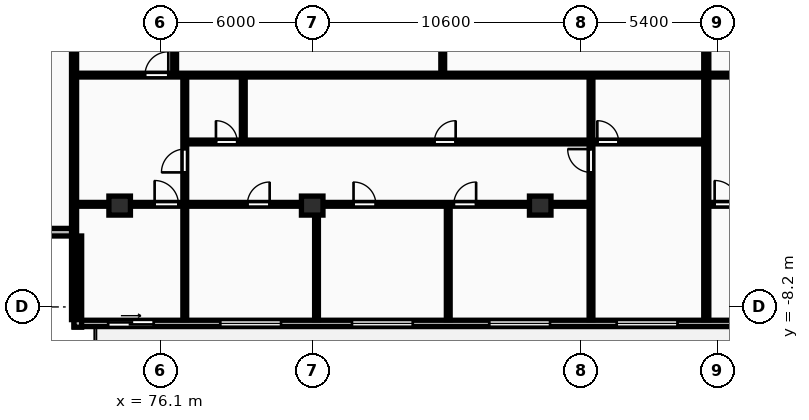
"""IFC4 building model, lengths in metres.
Left out: names, types, materials, properties, quantities, classifications, styles, units other than length and angle.
Written with IfcOpenShell. Run it as: python <this file> out.ifc"""

import sys

from ifc_helpers import new_model, si_unit, direction, frame, frame_2d, origin, origin_2d, place, context, subcontext, project, spatial, rectangle, extrude, element, fill, save


model = new_model("IFC4")
c1 = context("Model", 3, precision=1e-05, world=origin(), true_north=direction((0.0, 1.0)))
c2 = subcontext(c1, "Body", "Model", "MODEL_VIEW")
j1 = project(units=[si_unit("LENGTHUNIT", "METRE"), si_unit("PLANEANGLEUNIT", "RADIAN")], contexts=[c1])
p1 = place(None, origin())
s1 = spatial("IfcSite", under=j1, at=p1, CompositionType="ELEMENT")
p2 = place(p1, origin())
s2 = spatial("IfcBuilding", under=s1, at=p2, CompositionType="ELEMENT")
p3 = place(p2, frame((0.0, 0.0, 126.3)))
s3 = spatial("IfcBuildingStorey", under=s2, at=p3, CompositionType="ELEMENT", Elevation=126.3)
for number, where, z_axis, x_axis in (
    (1, (74.5, -4.2, 0.0), (0.0, 0.0, 1.0), (1.0, 0.0, 0.0)),
    (2, (82.1, -4.2, 0.0), (0.0, 0.0, 1.0), (1.0, 0.0, 0.0)),
    (3, (91.1, -4.2, 0.0), (0.0, 0.0, 1.0), (1.0, 0.0, 0.0)),
):
    element("IfcColumn", number, at=place(p3, frame(where, z_axis=z_axis, x_axis=x_axis)), inside=s3, PredefinedType="COLUMN", context=c2, shape_type="SweptSolid", body=[
        extrude(rectangle(XDim=0.85, YDim=0.75, at=origin_2d()), origin(), (0.0, 0.0, 1.0), 3.25),
    ])
p4 = place(p3, frame((72.7, -8.85, 0.0), z_axis=(0.0, 0.0, 1.0), x_axis=(1.0, 0.0, 0.0)))
e4 = element("IfcWall", 4, at=p4, inside=s3, PredefinedType="STANDARD", context=c2, shape_type="SweptSolid", body=[
    extrude(rectangle(XDim=58.0, YDim=0.25, at=frame_2d((29.0, 0.0))), origin(), (0.0, 0.0, 1.0), 2.97),
])
p5 = place(p4, frame((5.77, 0.0, 0.85)))
e5 = element("IfcOpeningElement", 5, at=p5, cuts=e4, PredefinedType="OPENING", context=c2, shape_type="SweptSolid", body=[
    extrude(rectangle(XDim=2.4, YDim=1.9, at=frame_2d((1.2, 0.95))), frame((0.0, 0.135, 0.0), z_axis=(0.0, -1.0, 0.0), x_axis=(1.0, 0.0, 0.0)), (0.0, 0.0, 1.0), 0.27),
])
p6 = place(p4, frame((10.97, 0.0, 0.85)))
e6 = element("IfcOpeningElement", 6, at=p6, cuts=e4, PredefinedType="OPENING", context=c2, shape_type="SweptSolid", body=[
    extrude(rectangle(XDim=2.4, YDim=1.9, at=frame_2d((1.2, 0.95))), frame((0.0, 0.135, 0.0), z_axis=(0.0, -1.0, 0.0), x_axis=(1.0, 0.0, 0.0)), (0.0, 0.0, 1.0), 0.27),
])
p7 = place(p4, frame((16.387, 0.0, 0.85)))
e7 = element("IfcOpeningElement", 7, at=p7, cuts=e4, PredefinedType="OPENING", context=c2, shape_type="SweptSolid", body=[
    extrude(rectangle(XDim=2.4, YDim=1.9, at=frame_2d((1.2, 0.95))), frame((0.0, 0.135, 0.0), z_axis=(0.0, -1.0, 0.0), x_axis=(1.0, 0.0, 0.0)), (0.0, 0.0, 1.0), 0.27),
])
p8 = place(p4, frame((1.345, 0.0, 0.0)))
e8 = element("IfcOpeningElement", 8, at=p8, cuts=e4, PredefinedType="OPENING", context=c2, shape_type="SweptSolid", body=[
    extrude(rectangle(XDim=1.8, YDim=2.2, at=frame_2d((0.9, 1.1))), frame((0.0, 0.135, 0.0), z_axis=(0.0, -1.0, 0.0), x_axis=(1.0, 0.0, 0.0)), (0.0, 0.0, 1.0), 0.27),
])
p9 = place(p4, frame((21.419, 0.0, 0.85)))
e9 = element("IfcOpeningElement", 9, at=p9, cuts=e4, PredefinedType="OPENING", context=c2, shape_type="SweptSolid", body=[
    extrude(rectangle(XDim=2.4, YDim=1.9, at=frame_2d((1.2, 0.95))), frame((0.0, 0.135, 0.0), z_axis=(0.0, -1.0, 0.0), x_axis=(1.0, 0.0, 0.0)), (0.0, 0.0, 1.0), 0.27),
])
p10 = place(p4, frame((30.827, 0.0, 0.85)))
e10 = element("IfcOpeningElement", 10, at=p10, cuts=e4, PredefinedType="OPENING", context=c2, shape_type="SweptSolid", body=[
    extrude(rectangle(XDim=2.4, YDim=1.9, at=frame_2d((1.2, 0.95))), frame((0.0, 0.135, 0.0), z_axis=(0.0, -1.0, 0.0), x_axis=(1.0, 0.0, 0.0)), (0.0, 0.0, 1.0), 0.27),
])
p11 = place(p4, frame((35.688, 0.0, 0.85)))
e11 = element("IfcOpeningElement", 11, at=p11, cuts=e4, PredefinedType="OPENING", context=c2, shape_type="SweptSolid", body=[
    extrude(rectangle(XDim=2.4, YDim=1.9, at=frame_2d((1.2, 0.95))), frame((0.0, 0.135, 0.0), z_axis=(0.0, -1.0, 0.0), x_axis=(1.0, 0.0, 0.0)), (0.0, 0.0, 1.0), 0.27),
])
p12 = place(p4, frame((26.405, 0.0, 0.0)))
e12 = element("IfcOpeningElement", 12, at=p12, cuts=e4, PredefinedType="OPENING", context=c2, shape_type="SweptSolid", body=[
    extrude(rectangle(XDim=1.8, YDim=2.2, at=frame_2d((0.9, 1.1))), frame((0.0, 0.135, 0.0), z_axis=(0.0, -1.0, 0.0), x_axis=(1.0, 0.0, 0.0)), (0.0, 0.0, 1.0), 0.27),
])
p13 = place(p4, frame((40.161, 0.0, 0.85)))
e13 = element("IfcOpeningElement", 13, at=p13, cuts=e4, PredefinedType="OPENING", context=c2, shape_type="SweptSolid", body=[
    extrude(rectangle(XDim=2.4, YDim=1.9, at=frame_2d((1.2, 0.95))), frame((0.0, 0.135, 0.0), z_axis=(0.0, -1.0, 0.0), x_axis=(1.0, 0.0, 0.0)), (0.0, 0.0, 1.0), 0.27),
])
p14 = place(p4, frame((48.113, 0.0, 0.0)))
e14 = element("IfcOpeningElement", 14, at=p14, cuts=e4, PredefinedType="OPENING", context=c2, shape_type="SweptSolid", body=[
    extrude(rectangle(XDim=1.8, YDim=2.2, at=frame_2d((0.9, 1.1))), frame((0.0, 0.135, 0.0), z_axis=(0.0, -1.0, 0.0), x_axis=(1.0, 0.0, 0.0)), (0.0, 0.0, 1.0), 0.27),
])
p15 = place(p4, frame((54.9, 0.0, 0.85)))
e15 = element("IfcOpeningElement", 15, at=p15, cuts=e4, PredefinedType="OPENING", context=c2, shape_type="SweptSolid", body=[
    extrude(rectangle(XDim=2.4, YDim=1.9, at=frame_2d((1.2, 0.95))), frame((0.0, 0.135, 0.0), z_axis=(0.0, -1.0, 0.0), x_axis=(1.0, 0.0, 0.0)), (0.0, 0.0, 1.0), 0.27),
])
p16 = place(p3, frame((69.1, -5.25, 0.0), z_axis=(0.0, 0.0, 1.0), x_axis=(1.0, 0.0, 0.0)))
e16 = element("IfcWall", 16, at=p16, inside=s3, PredefinedType="STANDARD", context=c2, shape_type="SweptSolid", body=[
    extrude(rectangle(XDim=3.6, YDim=0.3, at=frame_2d((1.8, 0.0))), origin(), (0.0, 0.0, 1.0), 2.97),
])
p17 = place(p3, frame((72.85, -5.4, 0.0), z_axis=(0.0, 0.0, 1.0), x_axis=(0.0, -1.0, 0.0)))
e17 = element("IfcWall", 17, at=p17, inside=s3, PredefinedType="STANDARD", context=c2, shape_type="SweptSolid", body=[
    extrude(rectangle(XDim=3.6, YDim=0.3, at=frame_2d((1.8, 0.0))), origin(), (0.0, 0.0, 1.0), 2.97),
])
for number, where, z_axis, x_axis in (
    (18, (72.7, -8.7, 0.0), (0.0, 0.0, 1.0), (0.0, 1.0, 0.0)),
    (19, (97.655, -8.7, 0.0), (0.0, 0.0, 1.0), (0.0, 1.0, 0.0)),
):
    element("IfcWall", number, at=place(p3, frame(where, z_axis=z_axis, x_axis=x_axis)), inside=s3, PredefinedType="PARTITIONING", context=c2, shape_type="SweptSolid", body=[
        extrude(rectangle(XDim=24.57, YDim=0.2, at=frame_2d((12.285, 0.0))), origin(), (0.0, 0.0, 1.0), 2.97),
    ])
p18 = place(p3, frame((87.252, 0.99, 0.0), z_axis=(0.0, 0.0, 1.0), x_axis=(0.0, 1.0, 0.0)))
e20 = element("IfcWall", 20, at=p18, inside=s3, PredefinedType="PARTITIONING", context=c2, shape_type="SweptSolid", body=[
    extrude(rectangle(XDim=14.9, YDim=0.15, at=frame_2d((7.45, 0.0))), origin(), (0.0, 0.0, 1.0), 2.97),
])
p19 = place(p18, frame((6.36, 0.0, 0.0)))
e21 = element("IfcOpeningElement", 21, at=p19, cuts=e20, PredefinedType="OPENING", context=c2, shape_type="SweptSolid", body=[
    extrude(rectangle(XDim=0.84, YDim=2.04, at=frame_2d((0.42, 1.02))), frame((0.0, 0.085, 0.0), z_axis=(0.0, -1.0, 0.0), x_axis=(1.0, 0.0, 0.0)), (0.0, 0.0, 1.0), 0.17),
])
p20 = place(p18, frame((7.7, 0.0, 0.0)))
e22 = element("IfcOpeningElement", 22, at=p20, cuts=e20, PredefinedType="OPENING", context=c2, shape_type="SweptSolid", body=[
    extrude(rectangle(XDim=0.88, YDim=2.06, at=frame_2d((0.44, 1.03))), frame((0.0, 0.085, 0.0), z_axis=(0.0, -1.0, 0.0), x_axis=(1.0, 0.0, 0.0)), (0.0, 0.0, 1.0), 0.17),
])
p21 = place(p3, frame((76.67, 0.99, 0.0), z_axis=(0.0, 0.0, 1.0), x_axis=(0.0, 1.0, 0.0)))
e23 = element("IfcWall", 23, at=p21, inside=s3, PredefinedType="PARTITIONING", context=c2, shape_type="SweptSolid", body=[
    extrude(rectangle(XDim=14.9, YDim=0.15, at=frame_2d((7.45, 0.0))), origin(), (0.0, 0.0, 1.0), 2.97),
])
p22 = place(p21, frame((3.216, 0.0, 0.0)))
e24 = element("IfcOpeningElement", 24, at=p22, cuts=e23, PredefinedType="OPENING", context=c2, shape_type="SweptSolid", body=[
    extrude(rectangle(XDim=0.88, YDim=2.06, at=frame_2d((0.44, 1.03))), frame((0.0, 0.085, 0.0), z_axis=(0.0, -1.0, 0.0), x_axis=(1.0, 0.0, 0.0)), (0.0, 0.0, 1.0), 0.17),
])
p23 = place(p3, frame((79.38, -1.67, 0.0), z_axis=(0.0, 0.0, 1.0), x_axis=(0.0, 1.0, 0.0)))
e25 = element("IfcWall", 25, at=p23, inside=s3, PredefinedType="PARTITIONING", context=c2, shape_type="SweptSolid", body=[
    extrude(rectangle(XDim=2.58, YDim=0.15, at=frame_2d((1.29, 0.0))), origin(), (0.0, 0.0, 1.0), 2.97),
])
for number, where, z_axis, x_axis in (
    (26, (82.27, -8.7, 0.0), (0.0, 0.0, 1.0), (0.0, 1.0, 0.0)),
    (27, (87.47, -8.7, 0.0), (0.0, 0.0, 1.0), (0.0, 1.0, 0.0)),
):
    element("IfcWall", number, at=place(p3, frame(where, z_axis=z_axis, x_axis=x_axis)), inside=s3, PredefinedType="PARTITIONING", context=c2, shape_type="SweptSolid", body=[
        extrude(rectangle(XDim=4.47, YDim=0.15, at=frame_2d((2.235, 0.0))), origin(), (0.0, 0.0, 1.0), 2.97),
    ])
p24 = place(p3, frame((77.07, -8.7, 0.0), z_axis=(0.0, 0.0, 1.0), x_axis=(0.0, 1.0, 0.0)))
e28 = element("IfcWall", 28, at=p24, inside=s3, PredefinedType="PARTITIONING", context=c2, shape_type="SweptSolid", body=[
    extrude(rectangle(XDim=9.61, YDim=0.15, at=frame_2d((4.805, 0.0))), origin(), (0.0, 0.0, 1.0), 2.97),
])
p25 = place(p24, frame((5.81, 0.0, 0.0)))
e29 = element("IfcOpeningElement", 29, at=p25, cuts=e28, PredefinedType="OPENING", context=c2, shape_type="SweptSolid", body=[
    extrude(rectangle(XDim=0.92, YDim=2.08, at=frame_2d((0.46, 1.04))), frame((0.0, 0.085, 0.0), z_axis=(0.0, -1.0, 0.0), x_axis=(1.0, 0.0, 0.0)), (0.0, 0.0, 1.0), 0.17),
])
p26 = place(p3, frame((93.104, -1.67, 0.0), z_axis=(0.0, 0.0, 1.0), x_axis=(0.0, 1.0, 0.0)))
e30 = element("IfcWall", 30, at=p26, inside=s3, PredefinedType="PARTITIONING", context=c2, shape_type="SweptSolid", body=[
    extrude(rectangle(XDim=2.58, YDim=0.15, at=frame_2d((1.29, 0.0))), origin(), (0.0, 0.0, 1.0), 2.97),
])
p27 = place(p3, frame((93.104, -8.7, 0.0), z_axis=(0.0, 0.0, 1.0), x_axis=(0.0, 1.0, 0.0)))
e31 = element("IfcWall", 31, at=p27, inside=s3, PredefinedType="PARTITIONING", context=c2, shape_type="SweptSolid", body=[
    extrude(rectangle(XDim=6.99, YDim=0.15, at=frame_2d((3.495, 0.0))), origin(), (0.0, 0.0, 1.0), 2.97),
])
p28 = place(p27, frame((5.81, 0.0, 0.0)))
e32 = element("IfcOpeningElement", 32, at=p28, cuts=e31, PredefinedType="OPENING", context=c2, shape_type="SweptSolid", body=[
    extrude(rectangle(XDim=0.92, YDim=2.08, at=frame_2d((0.46, 1.04))), frame((0.0, 0.085, 0.0), z_axis=(0.0, -1.0, 0.0), x_axis=(1.0, 0.0, 0.0)), (0.0, 0.0, 1.0), 0.17),
])
p29 = place(p3, frame((77.11, -1.69, 0.0), z_axis=(0.0, 0.0, 1.0), x_axis=(1.0, 0.0, 0.0)))
e33 = element("IfcWall", 33, at=p29, inside=s3, PredefinedType="PARTITIONING", context=c2, shape_type="SweptSolid", body=[
    extrude(rectangle(XDim=20.464, YDim=0.15, at=frame_2d((10.232, 0.0))), origin(), (0.0, 0.0, 1.0), 2.97),
])
p30 = place(p29, frame((1.191, 0.0, 0.0)))
e34 = element("IfcOpeningElement", 34, at=p30, cuts=e33, PredefinedType="OPENING", context=c2, shape_type="SweptSolid", body=[
    extrude(rectangle(XDim=0.84, YDim=2.04, at=frame_2d((0.42, 1.02))), frame((0.0, 0.085, 0.0), z_axis=(0.0, -1.0, 0.0), x_axis=(1.0, 0.0, 0.0)), (0.0, 0.0, 1.0), 0.17),
])
p31 = place(p29, frame((9.812, 0.0, 0.0)))
e35 = element("IfcOpeningElement", 35, at=p31, cuts=e33, PredefinedType="OPENING", context=c2, shape_type="SweptSolid", body=[
    extrude(rectangle(XDim=0.84, YDim=2.04, at=frame_2d((0.42, 1.02))), frame((0.0, 0.085, 0.0), z_axis=(0.0, -1.0, 0.0), x_axis=(1.0, 0.0, 0.0)), (0.0, 0.0, 1.0), 0.17),
])
p32 = place(p29, frame((16.244, 0.0, 0.0)))
e36 = element("IfcOpeningElement", 36, at=p32, cuts=e33, PredefinedType="OPENING", context=c2, shape_type="SweptSolid", body=[
    extrude(rectangle(XDim=0.84, YDim=2.04, at=frame_2d((0.42, 1.02))), frame((0.0, 0.085, 0.0), z_axis=(0.0, -1.0, 0.0), x_axis=(1.0, 0.0, 0.0)), (0.0, 0.0, 1.0), 0.17),
])
p33 = place(p3, frame((72.78, 0.95, 0.0), z_axis=(0.0, 0.0, 1.0), x_axis=(1.0, 0.0, 0.0)))
e37 = element("IfcWall", 37, at=p33, inside=s3, PredefinedType="PARTITIONING", context=c2, shape_type="SweptSolid", body=[
    extrude(rectangle(XDim=24.794, YDim=0.15, at=frame_2d((12.397, 0.0))), origin(), (0.0, 0.0, 1.0), 2.97),
])
p34 = place(p33, frame((2.72, 0.0, 0.0)))
e38 = element("IfcOpeningElement", 38, at=p34, cuts=e37, PredefinedType="OPENING", context=c2, shape_type="SweptSolid", body=[
    extrude(rectangle(XDim=0.92, YDim=2.08, at=frame_2d((0.46, 1.04))), frame((0.0, 0.085, 0.0), z_axis=(0.0, -1.0, 0.0), x_axis=(1.0, 0.0, 0.0)), (0.0, 0.0, 1.0), 0.17),
])
p35 = place(p3, frame((72.78, -4.15, 0.0), z_axis=(0.0, 0.0, 1.0), x_axis=(1.0, 0.0, 0.0)))
e39 = element("IfcWall", 39, at=p35, inside=s3, PredefinedType="PARTITIONING", context=c2, shape_type="SweptSolid", body=[
    extrude(rectangle(XDim=20.324, YDim=0.15, at=frame_2d((10.162, 0.0))), origin(), (0.0, 0.0, 1.0), 2.663),
])
p36 = place(p35, frame((3.1, 0.0, 0.0)))
e40 = element("IfcOpeningElement", 40, at=p36, cuts=e39, PredefinedType="OPENING", context=c2, shape_type="SweptSolid", body=[
    extrude(rectangle(XDim=0.94, YDim=2.1, at=frame_2d((0.47, 1.05))), frame((0.0, 0.085, 0.0), z_axis=(0.0, -1.0, 0.0), x_axis=(1.0, 0.0, 0.0)), (0.0, 0.0, 1.0), 0.17),
])
p37 = place(p35, frame((6.76, 0.0, 0.0)))
e41 = element("IfcOpeningElement", 41, at=p37, cuts=e39, PredefinedType="OPENING", context=c2, shape_type="SweptSolid", body=[
    extrude(rectangle(XDim=0.88, YDim=2.06, at=frame_2d((0.44, 1.03))), frame((0.0, 0.085, 0.0), z_axis=(0.0, -1.0, 0.0), x_axis=(1.0, 0.0, 0.0)), (0.0, 0.0, 1.0), 0.17),
])
p38 = place(p35, frame((10.952, 0.0, 0.0)))
e42 = element("IfcOpeningElement", 42, at=p38, cuts=e39, PredefinedType="OPENING", context=c2, shape_type="SweptSolid", body=[
    extrude(rectangle(XDim=0.88, YDim=2.06, at=frame_2d((0.44, 1.03))), frame((0.0, 0.085, 0.0), z_axis=(0.0, -1.0, 0.0), x_axis=(1.0, 0.0, 0.0)), (0.0, 0.0, 1.0), 0.17),
])
p39 = place(p35, frame((14.91, 0.0, 0.0)))
e43 = element("IfcOpeningElement", 43, at=p39, cuts=e39, PredefinedType="OPENING", context=c2, shape_type="SweptSolid", body=[
    extrude(rectangle(XDim=0.88, YDim=2.06, at=frame_2d((0.44, 1.03))), frame((0.0, 0.085, 0.0), z_axis=(0.0, -1.0, 0.0), x_axis=(1.0, 0.0, 0.0)), (0.0, 0.0, 1.0), 0.17),
])
p40 = place(p3, frame((97.735, 0.95, 0.0), z_axis=(0.0, 0.0, 1.0), x_axis=(1.0, 0.0, 0.0)))
e44 = element("IfcWall", 44, at=p40, inside=s3, PredefinedType="PARTITIONING", context=c2, shape_type="SweptSolid", body=[
    extrude(rectangle(XDim=18.472, YDim=0.15, at=frame_2d((9.236, 0.0))), origin(), (0.0, 0.0, 1.0), 2.97),
])
p41 = place(p40, frame((2.72, 0.0, 0.0)))
e45 = element("IfcOpeningElement", 45, at=p41, cuts=e44, PredefinedType="OPENING", context=c2, shape_type="SweptSolid", body=[
    extrude(rectangle(XDim=0.92, YDim=2.08, at=frame_2d((0.46, 1.04))), frame((0.0, 0.085, 0.0), z_axis=(0.0, -1.0, 0.0), x_axis=(1.0, 0.0, 0.0)), (0.0, 0.0, 1.0), 0.17),
])
p42 = place(p3, frame((97.735, -4.15, 0.0), z_axis=(0.0, 0.0, 1.0), x_axis=(1.0, 0.0, 0.0)))
e46 = element("IfcWall", 46, at=p42, inside=s3, PredefinedType="PARTITIONING", context=c2, shape_type="SweptSolid", body=[
    extrude(rectangle(XDim=14.222, YDim=0.15, at=frame_2d((7.111, 0.0))), origin(), (0.0, 0.0, 1.0), 2.663),
])
p43 = place(p42, frame((0.25, 0.0, 0.0)))
e47 = element("IfcOpeningElement", 47, at=p43, cuts=e46, PredefinedType="OPENING", context=c2, shape_type="SweptSolid", body=[
    extrude(rectangle(XDim=0.94, YDim=2.1, at=frame_2d((0.47, 1.05))), frame((0.0, 0.085, 0.0), z_axis=(0.0, -1.0, 0.0), x_axis=(1.0, 0.0, 0.0)), (0.0, 0.0, 1.0), 0.17),
])
p44 = place(p42, frame((6.671, 0.0, 0.0)))
e48 = element("IfcOpeningElement", 48, at=p44, cuts=e46, PredefinedType="OPENING", context=c2, shape_type="SweptSolid", body=[
    extrude(rectangle(XDim=0.88, YDim=2.06, at=frame_2d((0.44, 1.03))), frame((0.0, 0.085, 0.0), z_axis=(0.0, -1.0, 0.0), x_axis=(1.0, 0.0, 0.0)), (0.0, 0.0, 1.0), 0.17),
])
p45 = place(p42, frame((12.985, 0.0, 0.0)))
e49 = element("IfcOpeningElement", 49, at=p45, cuts=e46, PredefinedType="OPENING", context=c2, shape_type="SweptSolid", body=[
    extrude(rectangle(XDim=0.88, YDim=2.06, at=frame_2d((0.44, 1.03))), frame((0.0, 0.085, 0.0), z_axis=(0.0, -1.0, 0.0), x_axis=(1.0, 0.0, 0.0)), (0.0, 0.0, 1.0), 0.17),
])
p46 = place(p5, origin())
e50 = element("IfcWindow", 50, at=p46, inside=s3, PartitioningType="DOUBLE_PANEL_VERTICAL", PredefinedType="WINDOW", context=c2, shape_type="SweptSolid", body=[
    extrude(rectangle(XDim=2.4, YDim=1.9, at=frame_2d((1.2, 0.95))), frame((0.0, 0.03, 0.0), z_axis=(0.0, -1.0, 0.0), x_axis=(1.0, 0.0, 0.0)), (0.0, 0.0, 1.0), 0.06),
])
fill(e5, e50)
p47 = place(p6, origin())
e51 = element("IfcWindow", 51, at=p47, inside=s3, PartitioningType="DOUBLE_PANEL_VERTICAL", PredefinedType="WINDOW", context=c2, shape_type="SweptSolid", body=[
    extrude(rectangle(XDim=2.4, YDim=1.9, at=frame_2d((1.2, 0.95))), frame((0.0, 0.03, 0.0), z_axis=(0.0, -1.0, 0.0), x_axis=(1.0, 0.0, 0.0)), (0.0, 0.0, 1.0), 0.06),
])
fill(e6, e51)
p48 = place(p7, origin())
e52 = element("IfcWindow", 52, at=p48, inside=s3, PartitioningType="DOUBLE_PANEL_VERTICAL", PredefinedType="WINDOW", context=c2, shape_type="SweptSolid", body=[
    extrude(rectangle(XDim=2.4, YDim=1.9, at=frame_2d((1.2, 0.95))), frame((0.0, 0.03, 0.0), z_axis=(0.0, -1.0, 0.0), x_axis=(1.0, 0.0, 0.0)), (0.0, 0.0, 1.0), 0.06),
])
fill(e7, e52)
p49 = place(p8, origin())
e53 = element("IfcDoor", 53, at=p49, inside=s3, OperationType="SLIDING_TO_RIGHT", PredefinedType="DOOR", context=c2, shape_type="SweptSolid", body=[
    extrude(rectangle(XDim=1.8, YDim=2.2, at=frame_2d((0.9, 1.1))), frame((0.0, 0.025, 0.0), z_axis=(0.0, -1.0, 0.0), x_axis=(1.0, 0.0, 0.0)), (0.0, 0.0, 1.0), 0.05),
])
fill(e8, e53)
p50 = place(p9, origin())
e54 = element("IfcWindow", 54, at=p50, inside=s3, PartitioningType="DOUBLE_PANEL_VERTICAL", PredefinedType="WINDOW", context=c2, shape_type="SweptSolid", body=[
    extrude(rectangle(XDim=2.4, YDim=1.9, at=frame_2d((1.2, 0.95))), frame((0.0, 0.03, 0.0), z_axis=(0.0, -1.0, 0.0), x_axis=(1.0, 0.0, 0.0)), (0.0, 0.0, 1.0), 0.06),
])
fill(e9, e54)
p51 = place(p25, origin())
e55 = element("IfcDoor", 55, at=p51, inside=s3, OperationType="SINGLE_SWING_LEFT", PredefinedType="DOOR", context=c2, shape_type="SweptSolid", body=[
    extrude(rectangle(XDim=0.92, YDim=2.08, at=frame_2d((0.46, 1.04))), frame((0.0, 0.025, 0.0), z_axis=(0.0, -1.0, 0.0), x_axis=(1.0, 0.0, 0.0)), (0.0, 0.0, 1.0), 0.05),
])
fill(e29, e55)
p52 = place(p28, origin())
e56 = element("IfcDoor", 56, at=p52, inside=s3, OperationType="SINGLE_SWING_RIGHT", PredefinedType="DOOR", context=c2, shape_type="SweptSolid", body=[
    extrude(rectangle(XDim=0.92, YDim=2.08, at=frame_2d((0.46, 1.04))), frame((0.0, 0.025, 0.0), z_axis=(0.0, -1.0, 0.0), x_axis=(1.0, 0.0, 0.0)), (0.0, 0.0, 1.0), 0.05),
])
fill(e32, e56)
p53 = place(p30, origin())
e57 = element("IfcDoor", 57, at=p53, inside=s3, OperationType="SINGLE_SWING_LEFT", PredefinedType="DOOR", context=c2, shape_type="SweptSolid", body=[
    extrude(rectangle(XDim=0.84, YDim=2.04, at=frame_2d((0.42, 1.02))), frame((0.0, 0.025, 0.0), z_axis=(0.0, -1.0, 0.0), x_axis=(1.0, 0.0, 0.0)), (0.0, 0.0, 1.0), 0.05),
])
fill(e34, e57)
p54 = place(p31, origin())
e58 = element("IfcDoor", 58, at=p54, inside=s3, OperationType="SINGLE_SWING_RIGHT", PredefinedType="DOOR", context=c2, shape_type="SweptSolid", body=[
    extrude(rectangle(XDim=0.84, YDim=2.04, at=frame_2d((0.42, 1.02))), frame((0.0, 0.025, 0.0), z_axis=(0.0, -1.0, 0.0), x_axis=(1.0, 0.0, 0.0)), (0.0, 0.0, 1.0), 0.05),
])
fill(e35, e58)
p55 = place(p32, origin())
e59 = element("IfcDoor", 59, at=p55, inside=s3, OperationType="SINGLE_SWING_LEFT", PredefinedType="DOOR", context=c2, shape_type="SweptSolid", body=[
    extrude(rectangle(XDim=0.84, YDim=2.04, at=frame_2d((0.42, 1.02))), frame((0.0, 0.025, 0.0), z_axis=(0.0, -1.0, 0.0), x_axis=(1.0, 0.0, 0.0)), (0.0, 0.0, 1.0), 0.05),
])
fill(e36, e59)
p56 = place(p34, origin())
e60 = element("IfcDoor", 60, at=p56, inside=s3, OperationType="SINGLE_SWING_RIGHT", PredefinedType="DOOR", context=c2, shape_type="SweptSolid", body=[
    extrude(rectangle(XDim=0.92, YDim=2.08, at=frame_2d((0.46, 1.04))), frame((0.0, 0.025, 0.0), z_axis=(0.0, -1.0, 0.0), x_axis=(1.0, 0.0, 0.0)), (0.0, 0.0, 1.0), 0.05),
])
fill(e38, e60)
p57 = place(p36, origin())
e61 = element("IfcDoor", 61, at=p57, inside=s3, OperationType="SINGLE_SWING_LEFT", PredefinedType="DOOR", context=c2, shape_type="SweptSolid", body=[
    extrude(rectangle(XDim=0.94, YDim=2.1, at=frame_2d((0.47, 1.05))), frame((0.0, 0.025, 0.0), z_axis=(0.0, -1.0, 0.0), x_axis=(1.0, 0.0, 0.0)), (0.0, 0.0, 1.0), 0.05),
])
fill(e40, e61)
p58 = place(p37, origin())
e62 = element("IfcDoor", 62, at=p58, inside=s3, OperationType="SINGLE_SWING_RIGHT", PredefinedType="DOOR", context=c2, shape_type="SweptSolid", body=[
    extrude(rectangle(XDim=0.88, YDim=2.06, at=frame_2d((0.44, 1.03))), frame((0.0, 0.025, 0.0), z_axis=(0.0, -1.0, 0.0), x_axis=(1.0, 0.0, 0.0)), (0.0, 0.0, 1.0), 0.05),
])
fill(e41, e62)
p59 = place(p38, origin())
e63 = element("IfcDoor", 63, at=p59, inside=s3, OperationType="SINGLE_SWING_LEFT", PredefinedType="DOOR", context=c2, shape_type="SweptSolid", body=[
    extrude(rectangle(XDim=0.88, YDim=2.06, at=frame_2d((0.44, 1.03))), frame((0.0, 0.025, 0.0), z_axis=(0.0, -1.0, 0.0), x_axis=(1.0, 0.0, 0.0)), (0.0, 0.0, 1.0), 0.05),
])
fill(e42, e63)
p60 = place(p39, origin())
e64 = element("IfcDoor", 64, at=p60, inside=s3, OperationType="SINGLE_SWING_RIGHT", PredefinedType="DOOR", context=c2, shape_type="SweptSolid", body=[
    extrude(rectangle(XDim=0.88, YDim=2.06, at=frame_2d((0.44, 1.03))), frame((0.0, 0.025, 0.0), z_axis=(0.0, -1.0, 0.0), x_axis=(1.0, 0.0, 0.0)), (0.0, 0.0, 1.0), 0.05),
])
fill(e43, e64)
p61 = place(p43, origin())
e65 = element("IfcDoor", 65, at=p61, inside=s3, OperationType="SINGLE_SWING_LEFT", PredefinedType="DOOR", context=c2, shape_type="SweptSolid", body=[
    extrude(rectangle(XDim=0.94, YDim=2.1, at=frame_2d((0.47, 1.05))), frame((0.0, 0.025, 0.0), z_axis=(0.0, -1.0, 0.0), x_axis=(1.0, 0.0, 0.0)), (0.0, 0.0, 1.0), 0.05),
])
fill(e47, e65)
save(model, sys.argv[1])
